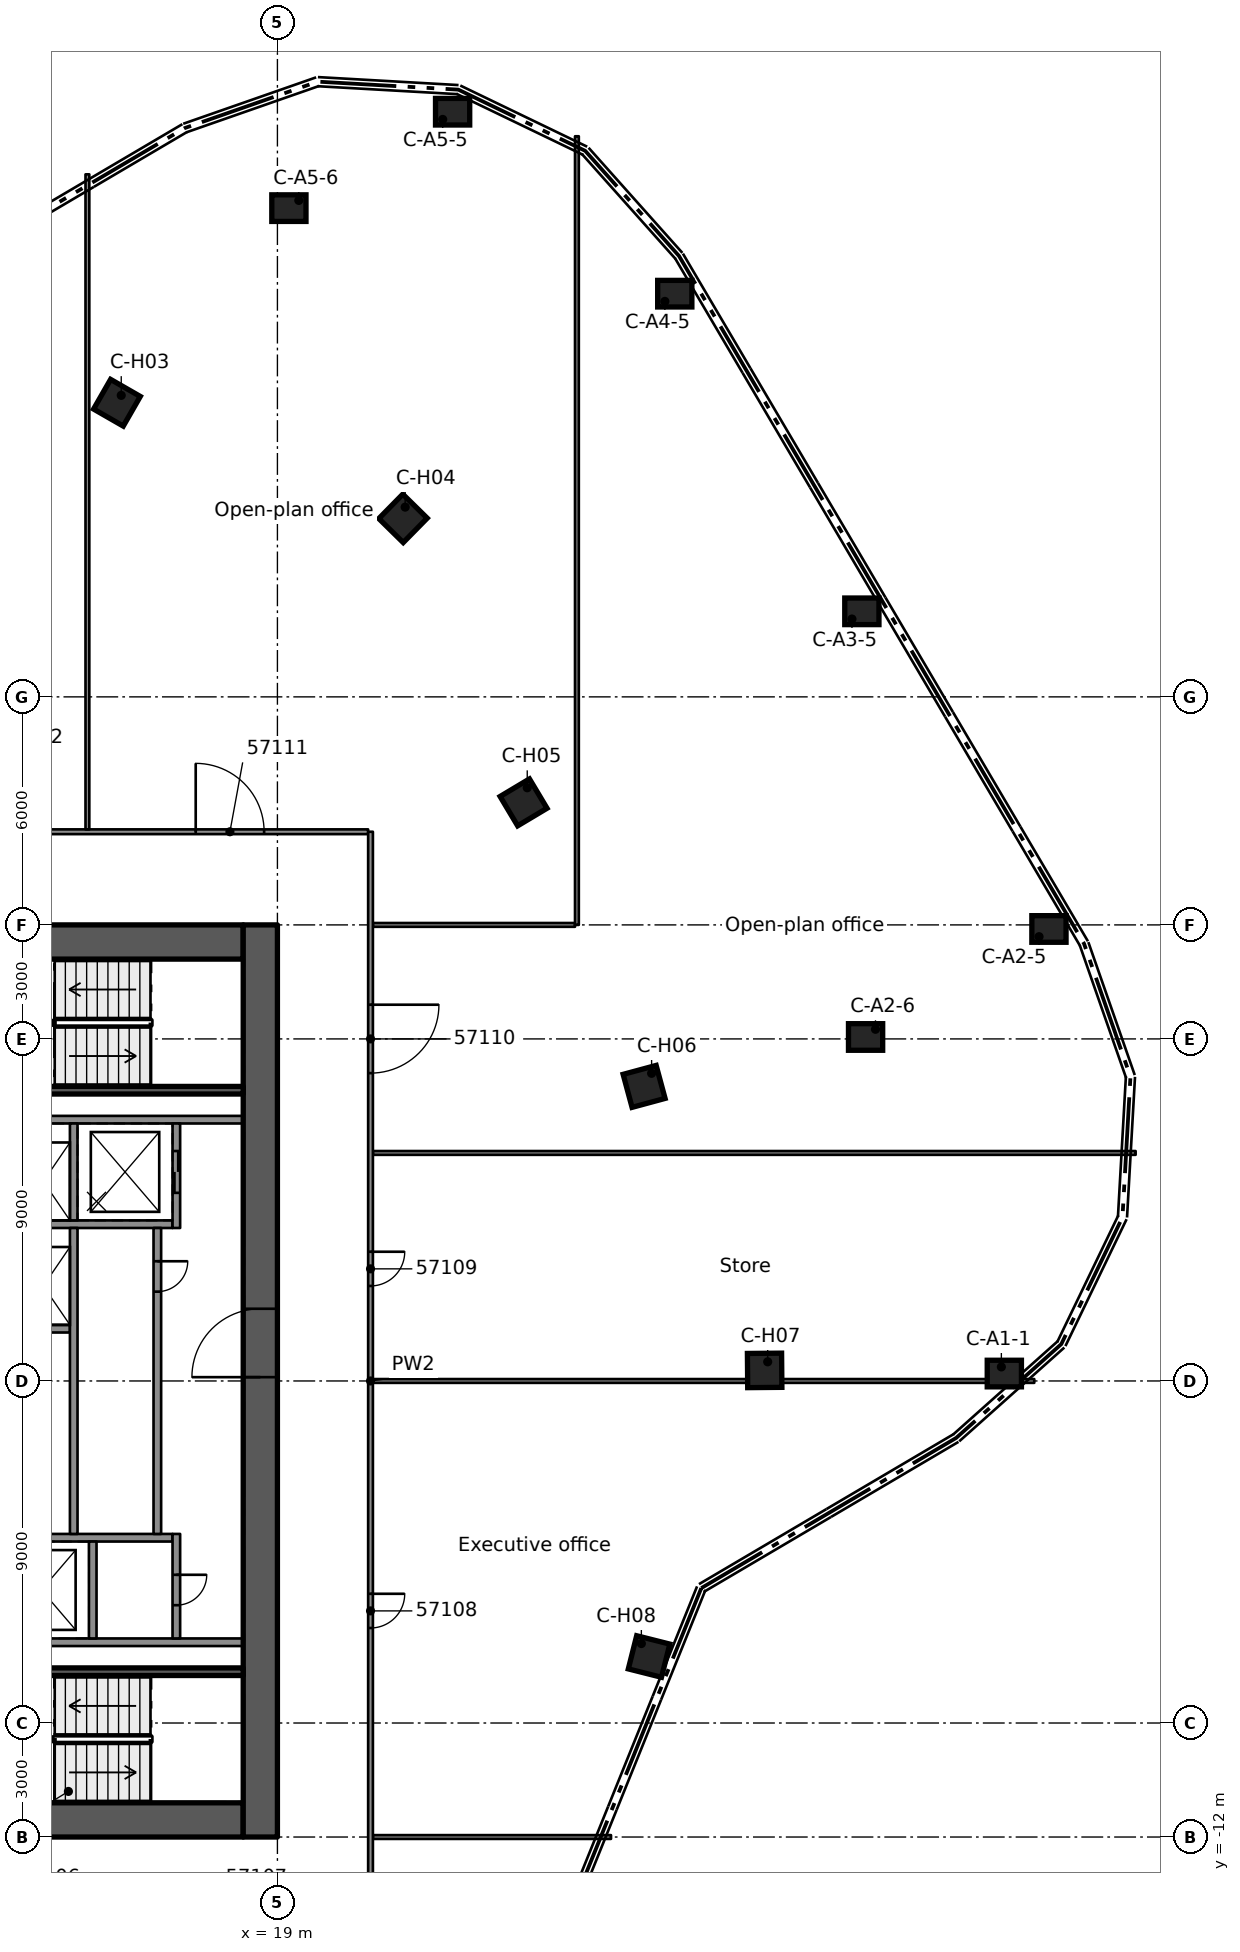
"""IFC4 building model, lengths in metres.
Left out: names, types, materials, properties, quantities, classifications, styles, units other than length and angle.
Written with IfcOpenShell. Run it as: python <this file> out.ifc"""

import sys

from ifc_helpers import new_model, si_unit, direction, frame, frame_2d, origin, origin_2d, place, context, subcontext, project, spatial, rectangle, extrude, element, fill, save


model = new_model("IFC4")
c1 = context("Model", 3, precision=1e-05, world=origin(), true_north=direction((0.0, 1.0)))
c2 = subcontext(c1, "Body", "Model", "MODEL_VIEW")
j1 = project(units=[si_unit("LENGTHUNIT", "METRE"), si_unit("PLANEANGLEUNIT", "RADIAN")], contexts=[c1])
p1 = place(None, origin())
s1 = spatial("IfcSite", under=j1, at=p1, CompositionType="ELEMENT")
p2 = place(p1, origin())
s2 = spatial("IfcBuilding", under=s1, at=p2, CompositionType="ELEMENT")
p3 = place(p2, frame((0.0, 0.0, 282.4)))
s3 = spatial("IfcBuildingStorey", under=s2, at=p3, CompositionType="ELEMENT", Elevation=282.4)
p4 = place(p3, frame((8.9, 11.55, 0.0), z_axis=(0.0, 0.0, 1.0), x_axis=(1.0, 0.0, 0.0)))
e1 = element("IfcWall", 1, at=p4, inside=s3, PredefinedType="SHEAR", context=c2, shape_type="SweptSolid", body=[
    extrude(rectangle(XDim=9.2, YDim=0.9, at=frame_2d((4.6, 0.0))), origin(), (0.0, 0.0, 1.0), 3.5),
])
p5 = place(p4, frame((3.0, 0.0, 0.0)))
e2 = element("IfcOpeningElement", 2, at=p5, cuts=e1, PredefinedType="OPENING", context=c2, shape_type="SweptSolid", body=[
    extrude(rectangle(XDim=1.1, YDim=2.1, at=frame_2d((0.55, 1.05))), frame((0.0, 0.46, 0.0), z_axis=(0.0, -1.0, 0.0), x_axis=(1.0, 0.0, 0.0)), (0.0, 0.0, 1.0), 0.92),
])
p6 = place(p4, frame((0.77, 0.0, 0.0)))
e3 = element("IfcOpeningElement", 3, at=p6, cuts=e1, PredefinedType="OPENING", context=c2, shape_type="SweptSolid", body=[
    extrude(rectangle(XDim=0.9, YDim=2.1, at=frame_2d((0.45, 1.05))), frame((0.0, 0.46, 0.0), z_axis=(0.0, -1.0, 0.0), x_axis=(1.0, 0.0, 0.0)), (0.0, 0.0, 1.0), 0.92),
])
p7 = place(p3, frame((8.9, -11.55, 0.0), z_axis=(0.0, 0.0, 1.0), x_axis=(1.0, 0.0, 0.0)))
e4 = element("IfcWall", 4, at=p7, inside=s3, PredefinedType="SHEAR", context=c2, shape_type="SweptSolid", body=[
    extrude(rectangle(XDim=9.2, YDim=0.9, at=frame_2d((4.6, 0.0))), origin(), (0.0, 0.0, 1.0), 3.5),
])
p8 = place(p7, frame((3.0, 0.0, 0.0)))
e5 = element("IfcOpeningElement", 5, at=p8, cuts=e4, PredefinedType="OPENING", context=c2, shape_type="SweptSolid", body=[
    extrude(rectangle(XDim=1.1, YDim=2.1, at=frame_2d((0.55, 1.05))), frame((0.0, 0.46, 0.0), z_axis=(0.0, -1.0, 0.0), x_axis=(1.0, 0.0, 0.0)), (0.0, 0.0, 1.0), 0.92),
])
p9 = place(p3, frame((18.55, -12.0, 0.0), z_axis=(0.0, 0.0, 1.0), x_axis=(0.0, 1.0, 0.0)))
e6 = element("IfcWall", 6, at=p9, inside=s3, PredefinedType="SHEAR", context=c2, shape_type="SweptSolid", body=[
    extrude(rectangle(XDim=24.0, YDim=0.9, at=frame_2d((12.0, 0.0))), origin(), (0.0, 0.0, 1.0), 3.5),
])
p10 = place(p9, frame((12.1, 0.0, 0.0)))
e7 = element("IfcOpeningElement", 7, at=p10, cuts=e6, PredefinedType="OPENING", context=c2, shape_type="SweptSolid", body=[
    extrude(rectangle(XDim=1.8, YDim=2.1, at=frame_2d((0.9, 1.05))), frame((0.0, 0.46, 0.0), z_axis=(0.0, -1.0, 0.0), x_axis=(1.0, 0.0, 0.0)), (0.0, 0.0, 1.0), 0.92),
])
for number, where, z_axis, x_axis in (
    (8, (38.128, 0.195, 0.0), (0.0, 0.0, 1.0), (1.0, 0.0, 0.0)),
    (9, (39.302, 11.893, 0.0), (0.0, 0.0, 1.0), (1.0, 0.0, 0.0)),
    (10, (34.477, 9.051, 0.0), (0.0, 0.0, 1.0), (1.0, 0.0, 0.0)),
    (11, (34.379, 20.251, 0.0), (0.0, 0.0, 1.0), (1.0, 0.0, 0.0)),
    (12, (29.456, 28.609, 0.0), (0.0, 0.0, 1.0), (1.0, 0.0, 0.0)),
    (13, (23.61, 33.397, 0.0), (0.0, 0.0, 1.0), (1.0, 0.0, 0.0)),
    (14, (19.302, 30.86, 0.0), (0.0, 0.0, 1.0), (1.0, 0.0, 0.0)),
):
    element("IfcColumn", number, at=place(p3, frame(where, z_axis=z_axis, x_axis=x_axis)), inside=s3, PredefinedType="COLUMN", context=c2, shape_type="SweptSolid", body=[
        extrude(rectangle(XDim=0.9, YDim=0.7, at=origin_2d()), origin(), (0.0, 0.0, 1.0), 3.5),
    ])
for number, where, z_axis, x_axis in (
    (15, (14.777, 25.739, 0.0), (0.0, 0.0, 1.0), (0.498, 0.867, 0.0)),
    (16, (22.305, 22.697, 0.0), (0.0, 0.0, 1.0), (0.701, 0.713, 0.0)),
    (17, (25.477, 15.224, 0.0), (0.0, 0.0, 1.0), (0.858, 0.513, 0.0)),
    (18, (28.649, 7.751, 0.0), (0.0, 0.0, 1.0), (0.965, 0.261, 0.0)),
    (19, (31.821, 0.278, 0.0), (0.0, 0.0, 1.0), (1.0, 0.009, 0.0)),
    (20, (28.78, -7.25, 0.0), (0.0, 0.0, 1.0), (0.97, -0.244, 0.0)),
):
    element("IfcColumn", number, at=place(p3, frame(where, z_axis=z_axis, x_axis=x_axis)), inside=s3, PredefinedType="COLUMN", context=c2, shape_type="SweptSolid", body=[
        extrude(rectangle(XDim=0.9, YDim=0.9, at=origin_2d()), origin(), (0.0, 0.0, 1.0), 3.5),
    ])
for number, where, z_axis, x_axis in (
    (21, (11.54, -6.875, 0.0), (0.0, 0.0, 1.0), (1.0, 0.0, 0.0)),
    (22, (11.54, 6.875, 0.0), (0.0, 0.0, 1.0), (1.0, 0.0, 0.0)),
):
    element("IfcWall", number, at=place(p3, frame(where, z_axis=z_axis, x_axis=x_axis)), inside=s3, PredefinedType="SOLIDWALL", context=c2, shape_type="SweptSolid", body=[
        extrude(rectangle(XDim=6.56, YDim=0.2, at=frame_2d((3.28, 0.0))), origin(), (0.0, 0.0, 1.0), 3.09),
    ])
p11 = place(p3, frame((11.54, 4.125, 0.0), z_axis=(0.0, 0.0, 1.0), x_axis=(1.0, 0.0, 0.0)))
e23 = element("IfcWall", 23, at=p11, inside=s3, PredefinedType="SOLIDWALL", context=c2, shape_type="SweptSolid", body=[
    extrude(rectangle(XDim=4.7, YDim=0.2, at=frame_2d((2.35, 0.0))), origin(), (0.0, 0.0, 1.0), 3.09),
])
p12 = place(p3, frame((11.54, 1.375, 0.0), z_axis=(0.0, 0.0, 1.0), x_axis=(1.0, 0.0, 0.0)))
e24 = element("IfcWall", 24, at=p12, inside=s3, PredefinedType="SOLIDWALL", context=c2, shape_type="SweptSolid", body=[
    extrude(rectangle(XDim=2.0, YDim=0.2, at=frame_2d((1.0, 0.0))), origin(), (0.0, 0.0, 1.0), 3.09),
])
p13 = place(p3, frame((11.54, -4.125, 0.0), z_axis=(0.0, 0.0, 1.0), x_axis=(1.0, 0.0, 0.0)))
e25 = element("IfcWall", 25, at=p13, inside=s3, PredefinedType="SOLIDWALL", context=c2, shape_type="SweptSolid", body=[
    extrude(rectangle(XDim=4.7, YDim=0.2, at=frame_2d((2.35, 0.0))), origin(), (0.0, 0.0, 1.0), 3.09),
])
p14 = place(p3, frame((13.64, 6.775, 0.0), z_axis=(0.0, 0.0, 1.0), x_axis=(0.0, -1.0, 0.0)))
e26 = element("IfcWall", 26, at=p14, inside=s3, PredefinedType="SOLIDWALL", context=c2, shape_type="SweptSolid", body=[
    extrude(rectangle(XDim=2.55, YDim=0.2, at=frame_2d((1.275, 0.0))), origin(), (0.0, 0.0, 1.0), 3.09),
])
p15 = place(p3, frame((13.64, 4.025, 0.0), z_axis=(0.0, 0.0, 1.0), x_axis=(0.0, -1.0, 0.0)))
e27 = element("IfcWall", 27, at=p15, inside=s3, PredefinedType="SOLIDWALL", context=c2, shape_type="SweptSolid", body=[
    extrude(rectangle(XDim=8.05, YDim=0.2, at=frame_2d((4.025, 0.0))), origin(), (0.0, 0.0, 1.0), 3.09),
])
p16 = place(p3, frame((14.14, -4.225, 0.0), z_axis=(0.0, 0.0, 1.0), x_axis=(0.0, -1.0, 0.0)))
e28 = element("IfcWall", 28, at=p16, inside=s3, PredefinedType="SOLIDWALL", context=c2, shape_type="SweptSolid", body=[
    extrude(rectangle(XDim=2.55, YDim=0.2, at=frame_2d((1.275, 0.0))), origin(), (0.0, 0.0, 1.0), 3.09),
])
p17 = place(p3, frame((16.34, 6.775, 0.0), z_axis=(0.0, 0.0, 1.0), x_axis=(0.0, -1.0, 0.0)))
e29 = element("IfcWall", 29, at=p17, inside=s3, PredefinedType="SOLIDWALL", context=c2, shape_type="SweptSolid", body=[
    extrude(rectangle(XDim=2.75, YDim=0.2, at=frame_2d((1.375, 0.0))), origin(), (0.0, 0.0, 1.0), 3.09),
])
p18 = place(p17, frame((0.725, 0.0, 0.0)))
e30 = element("IfcOpeningElement", 30, at=p18, cuts=e29, PredefinedType="OPENING", context=c2, shape_type="SweptSolid", body=[
    extrude(rectangle(XDim=1.1, YDim=2.1, at=frame_2d((0.55, 1.05))), frame((0.0, 0.11, 0.0), z_axis=(0.0, -1.0, 0.0), x_axis=(1.0, 0.0, 0.0)), (0.0, 0.0, 1.0), 0.22),
])
p19 = place(p3, frame((15.84, 4.025, 0.0), z_axis=(0.0, 0.0, 1.0), x_axis=(0.0, -1.0, 0.0)))
e31 = element("IfcWall", 31, at=p19, inside=s3, PredefinedType="SOLIDWALL", context=c2, shape_type="SweptSolid", body=[
    extrude(rectangle(XDim=8.05, YDim=0.2, at=frame_2d((4.025, 0.0))), origin(), (0.0, 0.0, 1.0), 3.09),
])
p20 = place(p19, frame((0.875, 0.0, 0.0)))
e32 = element("IfcOpeningElement", 32, at=p20, cuts=e31, PredefinedType="OPENING", context=c2, shape_type="SweptSolid", body=[
    extrude(rectangle(XDim=0.8, YDim=2.1, at=frame_2d((0.4, 1.05))), frame((0.0, 0.11, 0.0), z_axis=(0.0, -1.0, 0.0), x_axis=(1.0, 0.0, 0.0)), (0.0, 0.0, 1.0), 0.22),
])
p21 = place(p3, frame((16.34, -4.025, 0.0), z_axis=(0.0, 0.0, 1.0), x_axis=(0.0, -1.0, 0.0)))
e33 = element("IfcWall", 33, at=p21, inside=s3, PredefinedType="SOLIDWALL", context=c2, shape_type="SweptSolid", body=[
    extrude(rectangle(XDim=2.75, YDim=0.2, at=frame_2d((1.375, 0.0))), origin(), (0.0, 0.0, 1.0), 3.09),
])
p22 = place(p21, frame((1.075, 0.0, 0.0)))
e34 = element("IfcOpeningElement", 34, at=p22, cuts=e33, PredefinedType="OPENING", context=c2, shape_type="SweptSolid", body=[
    extrude(rectangle(XDim=0.8, YDim=2.1, at=frame_2d((0.4, 1.05))), frame((0.0, 0.11, 0.0), z_axis=(0.0, -1.0, 0.0), x_axis=(1.0, 0.0, 0.0)), (0.0, 0.0, 1.0), 0.22),
])
for number, where, z_axis, x_axis in (
    (35, (11.54, -7.65, 0.0), (0.0, 0.0, 1.0), (1.0, 0.0, 0.0)),
    (36, (11.54, 7.65, 0.0), (0.0, 0.0, 1.0), (1.0, 0.0, 0.0)),
):
    element("IfcWall", number, at=place(p3, frame(where, z_axis=z_axis, x_axis=x_axis)), inside=s3, PredefinedType="SOLIDWALL", context=c2, shape_type="SweptSolid", body=[
        extrude(rectangle(XDim=6.56, YDim=0.2, at=frame_2d((3.28, 0.0))), origin(), (0.0, 0.0, 1.0), 3.09),
    ])
p23 = place(p3, frame((21.512, -12.0, 0.0), z_axis=(0.0, 0.0, 1.0), x_axis=(1.0, 0.0, 0.0)))
e37 = element("IfcWall", 37, at=p23, inside=s3, PredefinedType="PARTITIONING", context=c2, shape_type="SweptSolid", body=[
    extrude(rectangle(XDim=6.266, YDim=0.1, at=frame_2d((3.133, 0.0))), origin(), (0.0, 0.0, 1.0), 3.08),
])
p24 = place(p3, frame((21.512, 0.0, 0.0), z_axis=(0.0, 0.0, 1.0), x_axis=(1.0, 0.0, 0.0)))
e38 = element("IfcWall", 38, at=p24, inside=s3, PredefinedType="PARTITIONING", context=c2, shape_type="SweptSolid", body=[
    extrude(rectangle(XDim=17.404, YDim=0.1, at=frame_2d((8.702, 0.0))), origin(), (0.0, 0.0, 1.0), 3.08),
])
p25 = place(p3, frame((21.512, 6.0, 0.0), z_axis=(0.0, 0.0, 1.0), x_axis=(1.0, 0.0, 0.0)))
e39 = element("IfcWall", 39, at=p25, inside=s3, PredefinedType="PARTITIONING", context=c2, shape_type="SweptSolid", body=[
    extrude(rectangle(XDim=20.071, YDim=0.1, at=frame_2d((10.036, 0.0))), origin(), (0.0, 0.0, 1.0), 3.08),
])
p26 = place(p3, frame((21.512, 12.0, 0.0), z_axis=(0.0, 0.0, 1.0), x_axis=(1.0, 0.0, 0.0)))
e40 = element("IfcWall", 40, at=p26, inside=s3, PredefinedType="PARTITIONING", context=c2, shape_type="SweptSolid", body=[
    extrude(rectangle(XDim=5.319, YDim=0.1, at=frame_2d((2.66, 0.0))), origin(), (0.0, 0.0, 1.0), 3.08),
])
p27 = place(p3, frame((10.35, 14.451, 0.0), z_axis=(0.0, 0.0, 1.0), x_axis=(1.0, 0.0, 0.0)))
e41 = element("IfcWall", 41, at=p27, inside=s3, PredefinedType="PARTITIONING", context=c2, shape_type="SweptSolid", body=[
    extrude(rectangle(XDim=11.037, YDim=0.125, at=frame_2d((5.519, 0.0))), origin(), (0.0, 0.0, 1.0), 3.08),
])
p28 = place(p27, frame((6.5, 0.0, 0.0)))
e42 = element("IfcOpeningElement", 42, at=p28, cuts=e41, PredefinedType="OPENING", context=c2, shape_type="SweptSolid", body=[
    extrude(rectangle(XDim=1.8, YDim=2.1, at=frame_2d((0.9, 1.05))), frame((0.0, 0.073, 0.0), z_axis=(0.0, -1.0, 0.0), x_axis=(1.0, 0.0, 0.0)), (0.0, 0.0, 1.0), 0.145),
])
p29 = place(p27, frame((0.85, 0.0, 0.0)))
e43 = element("IfcOpeningElement", 43, at=p29, cuts=e41, PredefinedType="OPENING", context=c2, shape_type="SweptSolid", body=[
    extrude(rectangle(XDim=1.8, YDim=2.1, at=frame_2d((0.9, 1.05))), frame((0.0, 0.073, 0.0), z_axis=(0.0, -1.0, 0.0), x_axis=(1.0, 0.0, 0.0)), (0.0, 0.0, 1.0), 0.145),
])
p30 = place(p3, frame((26.881, 12.0, 0.0), z_axis=(0.0, 0.0, 1.0), x_axis=(0.0, 1.0, 0.0)))
e44 = element("IfcWall", 44, at=p30, inside=s3, PredefinedType="PARTITIONING", context=c2, shape_type="SweptSolid", body=[
    extrude(rectangle(XDim=20.751, YDim=0.1, at=frame_2d((10.375, 0.0))), origin(), (0.0, 0.0, 1.0), 3.08),
])
p31 = place(p3, frame((21.45, 14.451, 0.0), z_axis=(0.0, 0.0, 1.0), x_axis=(0.0, -1.0, 0.0)))
e45 = element("IfcWall", 45, at=p31, inside=s3, PredefinedType="PARTITIONING", context=c2, shape_type="SweptSolid", body=[
    extrude(rectangle(XDim=28.902, YDim=0.125, at=frame_2d((14.451, 0.0))), origin(), (0.0, 0.0, 1.0), 3.08),
])
p32 = place(p31, frame((20.051, 0.0, 0.0)))
e46 = element("IfcOpeningElement", 46, at=p32, cuts=e45, PredefinedType="OPENING", context=c2, shape_type="SweptSolid", body=[
    extrude(rectangle(XDim=0.9, YDim=2.1, at=frame_2d((0.45, 1.05))), frame((0.0, 0.073, 0.0), z_axis=(0.0, -1.0, 0.0), x_axis=(1.0, 0.0, 0.0)), (0.0, 0.0, 1.0), 0.145),
])
p33 = place(p31, frame((11.051, 0.0, 0.0)))
e47 = element("IfcOpeningElement", 47, at=p33, cuts=e45, PredefinedType="OPENING", context=c2, shape_type="SweptSolid", body=[
    extrude(rectangle(XDim=0.9, YDim=2.1, at=frame_2d((0.45, 1.05))), frame((0.0, 0.073, 0.0), z_axis=(0.0, -1.0, 0.0), x_axis=(1.0, 0.0, 0.0)), (0.0, 0.0, 1.0), 0.145),
])
p34 = place(p31, frame((4.551, 0.0, 0.0)))
e48 = element("IfcOpeningElement", 48, at=p34, cuts=e45, PredefinedType="OPENING", context=c2, shape_type="SweptSolid", body=[
    extrude(rectangle(XDim=1.8, YDim=2.1, at=frame_2d((0.9, 1.05))), frame((0.0, 0.073, 0.0), z_axis=(0.0, -1.0, 0.0), x_axis=(1.0, 0.0, 0.0)), (0.0, 0.0, 1.0), 0.145),
])
p35 = place(p3, frame((14.0, 14.514, 0.0), z_axis=(0.0, 0.0, 1.0), x_axis=(0.0, 1.0, 0.0)))
e49 = element("IfcWall", 49, at=p35, inside=s3, PredefinedType="PARTITIONING", context=c2, shape_type="SweptSolid", body=[
    extrude(rectangle(XDim=17.235, YDim=0.1, at=frame_2d((8.618, 0.0))), origin(), (0.0, 0.0, 1.0), 3.08),
])
p36 = place(p18, origin())
e50 = element("IfcDoor", 50, at=p36, inside=s3, OperationType="DOUBLE_DOOR_SLIDING", PredefinedType="DOOR", context=c2, shape_type="SweptSolid", body=[
    extrude(rectangle(XDim=1.1, YDim=2.1, at=frame_2d((0.55, 1.05))), frame((0.0, 0.025, 0.0), z_axis=(0.0, -1.0, 0.0), x_axis=(1.0, 0.0, 0.0)), (0.0, 0.0, 1.0), 0.05),
])
fill(e30, e50)
p37 = place(p20, origin())
e51 = element("IfcDoor", 51, at=p37, inside=s3, OperationType="SINGLE_SWING_LEFT", PredefinedType="DOOR", context=c2, shape_type="SweptSolid", body=[
    extrude(rectangle(XDim=0.8, YDim=2.1, at=frame_2d((0.4, 1.05))), frame((0.0, 0.025, 0.0), z_axis=(0.0, -1.0, 0.0), x_axis=(1.0, 0.0, 0.0)), (0.0, 0.0, 1.0), 0.05),
])
fill(e32, e51)
p38 = place(p22, origin())
e52 = element("IfcDoor", 52, at=p38, inside=s3, OperationType="SINGLE_SWING_LEFT", PredefinedType="DOOR", context=c2, shape_type="SweptSolid", body=[
    extrude(rectangle(XDim=0.8, YDim=2.1, at=frame_2d((0.4, 1.05))), frame((0.0, 0.025, 0.0), z_axis=(0.0, -1.0, 0.0), x_axis=(1.0, 0.0, 0.0)), (0.0, 0.0, 1.0), 0.05),
])
fill(e34, e52)
p39 = place(p10, origin())
e53 = element("IfcDoor", 53, at=p39, inside=s3, OperationType="SINGLE_SWING_RIGHT", PredefinedType="DOOR", context=c2, shape_type="SweptSolid", body=[
    extrude(rectangle(XDim=1.8, YDim=2.1, at=frame_2d((0.9, 1.05))), frame((0.0, 0.025, 0.0), z_axis=(0.0, -1.0, 0.0), x_axis=(1.0, 0.0, 0.0)), (0.0, 0.0, 1.0), 0.05),
])
fill(e7, e53)
p40 = place(p32, origin())
e54 = element("IfcDoor", 54, at=p40, inside=s3, OperationType="SINGLE_SWING_RIGHT", PredefinedType="DOOR", context=c2, shape_type="SweptSolid", body=[
    extrude(rectangle(XDim=0.9, YDim=2.1, at=frame_2d((0.45, 1.05))), frame((0.0, 0.025, 0.0), z_axis=(0.0, -1.0, 0.0), x_axis=(1.0, 0.0, 0.0)), (0.0, 0.0, 1.0), 0.05),
])
fill(e46, e54)
p41 = place(p33, origin())
e55 = element("IfcDoor", 55, at=p41, inside=s3, OperationType="SINGLE_SWING_LEFT", PredefinedType="DOOR", context=c2, shape_type="SweptSolid", body=[
    extrude(rectangle(XDim=0.9, YDim=2.1, at=frame_2d((0.45, 1.05))), frame((0.0, 0.025, 0.0), z_axis=(0.0, -1.0, 0.0), x_axis=(1.0, 0.0, 0.0)), (0.0, 0.0, 1.0), 0.05),
])
fill(e47, e55)
p42 = place(p34, origin())
e56 = element("IfcDoor", 56, at=p42, inside=s3, OperationType="DOUBLE_DOOR_SINGLE_SWING", PredefinedType="DOOR", context=c2, shape_type="SweptSolid", body=[
    extrude(rectangle(XDim=1.8, YDim=2.1, at=frame_2d((0.9, 1.05))), frame((0.0, 0.025, 0.0), z_axis=(0.0, -1.0, 0.0), x_axis=(1.0, 0.0, 0.0)), (0.0, 0.0, 1.0), 0.05),
])
fill(e48, e56)
p43 = place(p28, origin())
e57 = element("IfcDoor", 57, at=p43, inside=s3, OperationType="DOUBLE_DOOR_SINGLE_SWING", PredefinedType="DOOR", context=c2, shape_type="SweptSolid", body=[
    extrude(rectangle(XDim=1.8, YDim=2.1, at=frame_2d((0.9, 1.05))), frame((0.0, 0.025, 0.0), z_axis=(0.0, -1.0, 0.0), x_axis=(1.0, 0.0, 0.0)), (0.0, 0.0, 1.0), 0.05),
])
fill(e42, e57)
save(model, sys.argv[1])
